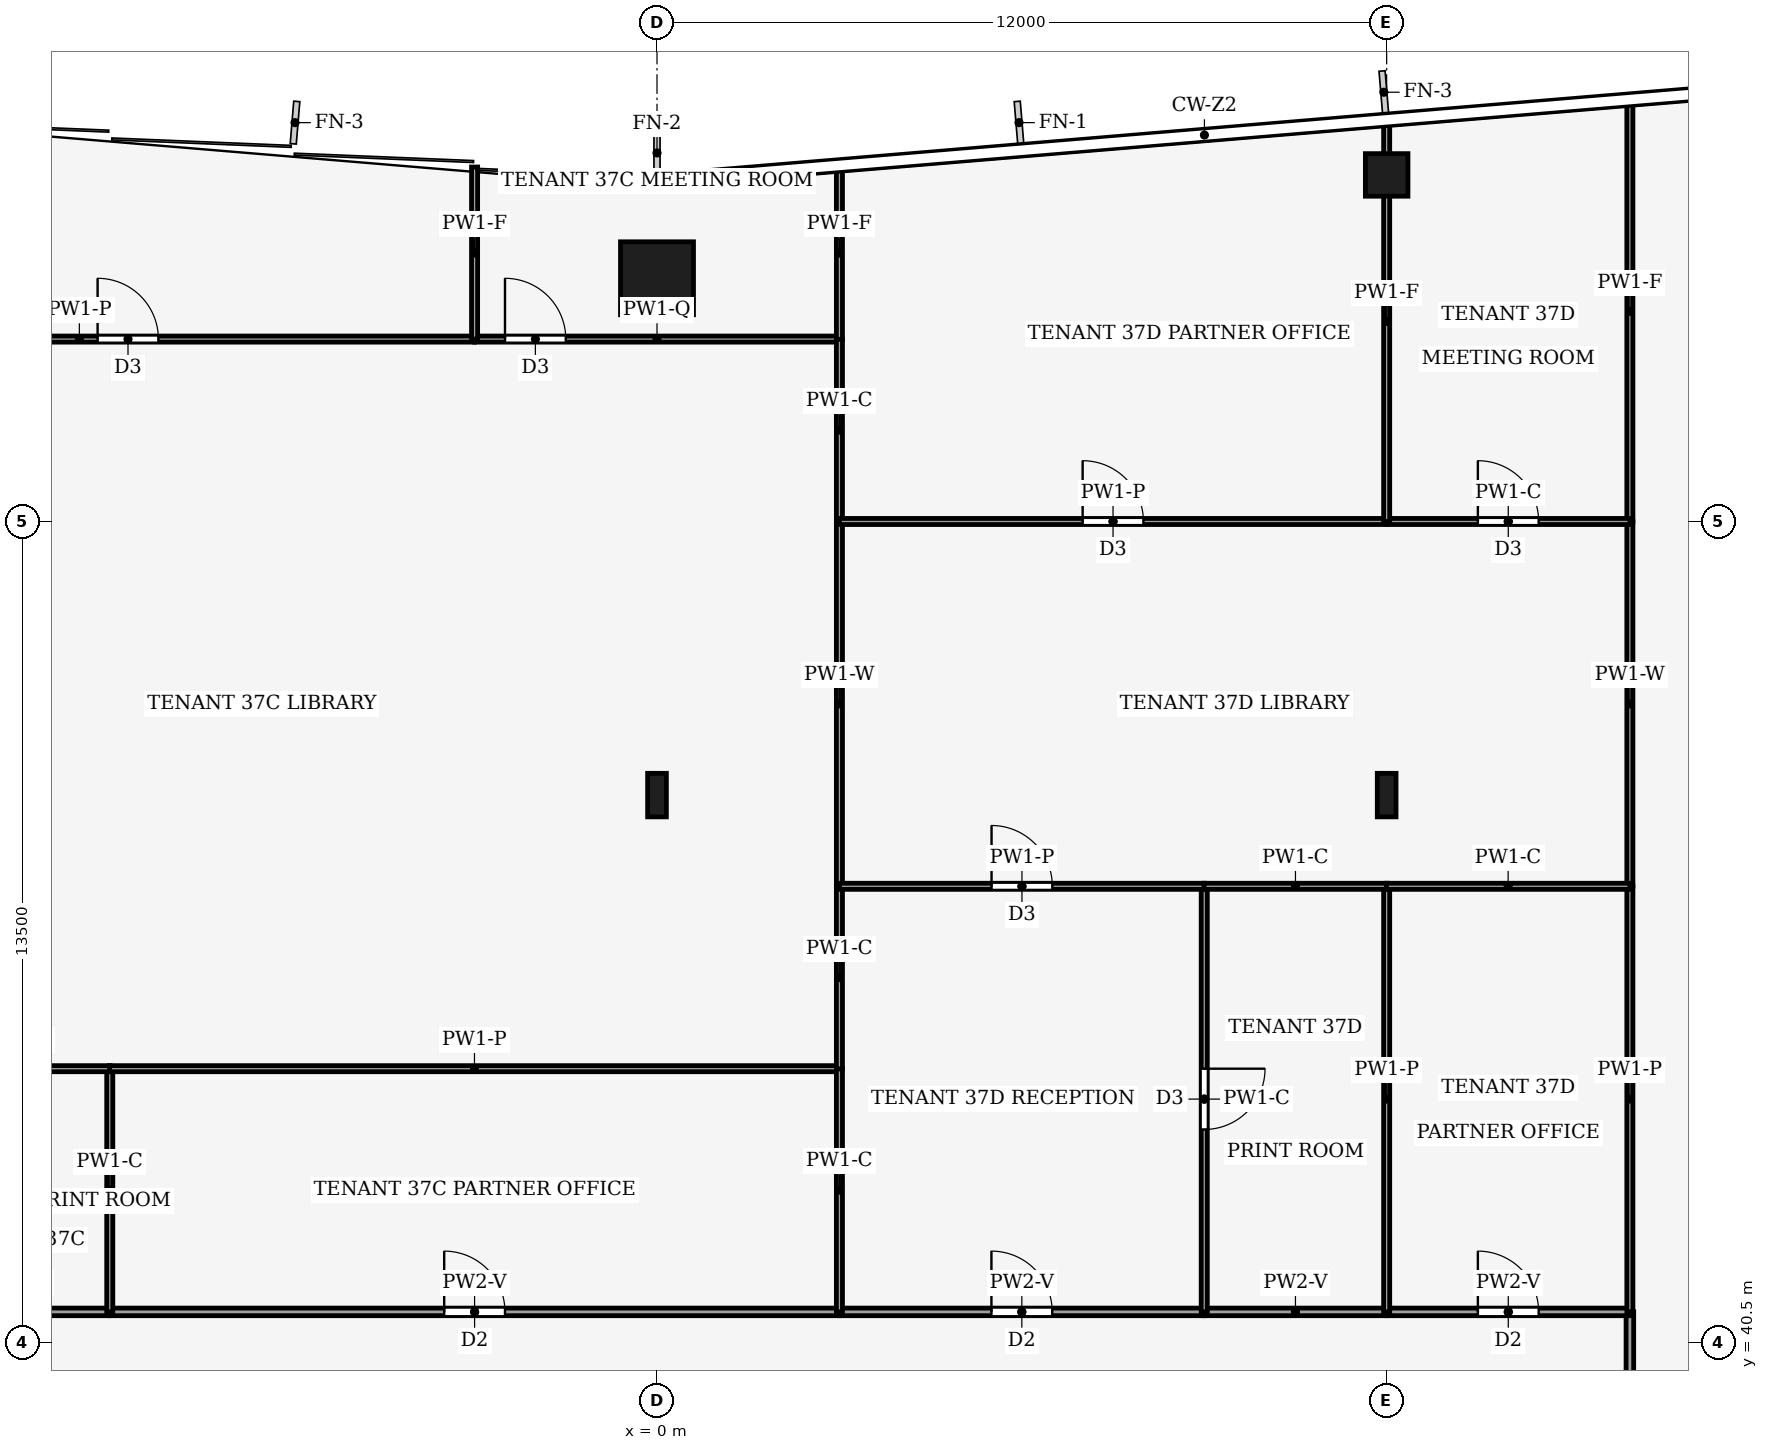
"""IFC4 building model, lengths in metres.
Left out: names, types, materials, properties, quantities, classifications, styles, units other than length and angle.
Written with IfcOpenShell. Run it as: python <this file> out.ifc"""

import sys

from ifc_helpers import new_model, si_unit, direction, frame, frame_2d, origin, origin_2d, place, context, subcontext, project, spatial, rectangle, hollow_rectangle, i_section, extrude, element, fill, save


model = new_model("IFC4")
c1 = context("Model", 3, precision=1e-05, world=origin(), true_north=direction((0.0, 1.0)))
c2 = subcontext(c1, "Body", "Model", "MODEL_VIEW")
j1 = project(units=[si_unit("LENGTHUNIT", "METRE"), si_unit("PLANEANGLEUNIT", "RADIAN")], contexts=[c1])
p1 = place(None, origin())
s1 = spatial("IfcSite", under=j1, at=p1, CompositionType="ELEMENT")
p2 = place(p1, origin())
s2 = spatial("IfcBuilding", under=s1, at=p2, CompositionType="ELEMENT")
p3 = place(p2, frame((0.0, 0.0, 162.0)))
s3 = spatial("IfcBuildingStorey", under=s2, at=p3, CompositionType="ELEMENT", Elevation=162.0)
p4 = place(p3, frame((0.0, 58.0, 0.0), z_axis=(0.0, 0.0, 1.0), x_axis=(1.0, 0.0, 0.0)))
e1 = element("IfcColumn", 1, at=p4, inside=s3, PredefinedType="COLUMN", context=c2, shape_type="SweptSolid", body=[
    extrude(hollow_rectangle(XDim=1.2, YDim=1.2, WallThickness=0.07, at=origin_2d()), origin(), (0.0, 0.0, 1.0), 4.0),
])
p5 = place(p3, frame((12.0, 59.7, 0.0), z_axis=(0.0, 0.0, 1.0), x_axis=(1.0, 0.0, 0.0)))
e2 = element("IfcColumn", 2, at=p5, inside=s3, PredefinedType="COLUMN", context=c2, shape_type="SweptSolid", body=[
    extrude(hollow_rectangle(XDim=0.7, YDim=0.7, WallThickness=0.03, at=origin_2d()), origin(), (0.0, 0.0, 1.0), 4.0),
])
for number, where, z_axis, x_axis in (
    (3, (0.0, 49.5, 0.0), (0.0, 0.0, 1.0), (1.0, 0.0, 0.0)),
    (4, (12.0, 49.5, 0.0), (0.0, 0.0, 1.0), (1.0, 0.0, 0.0)),
):
    element("IfcColumn", number, at=place(p3, frame(where, z_axis=z_axis, x_axis=x_axis)), inside=s3, PredefinedType="COLUMN", context=c2, shape_type="SweptSolid", body=[
        extrude(i_section(OverallWidth=0.308, OverallDepth=0.716, WebThickness=0.021, FlangeThickness=0.04, FilletRadius=0.027, at=origin_2d()), origin(), (0.0, 0.0, 1.0), 4.0),
    ])
p6 = place(p3, frame((16.0, 41.004, 0.0), z_axis=(0.0, 0.0, 1.0), x_axis=(0.0, -1.0, 0.0)))
e5 = element("IfcWall", 5, at=p6, inside=s3, PredefinedType="PARTITIONING", context=c2, shape_type="SweptSolid", body=[
    extrude(rectangle(XDim=11.004, YDim=0.125, at=frame_2d((5.502, 0.0))), origin(), (0.0, 0.0, 1.0), 3.14),
])
p7 = place(p6, frame((5.002, 0.0, 0.0)))
e6 = element("IfcOpeningElement", 6, at=p7, cuts=e5, PredefinedType="OPENING", context=c2, shape_type="SweptSolid", body=[
    extrude(rectangle(XDim=1.0, YDim=2.1, at=frame_2d((0.5, 1.05))), frame((0.0, 0.073, 0.0), z_axis=(0.0, -1.0, 0.0), x_axis=(1.0, 0.0, 0.0)), (0.0, 0.0, 1.0), 0.145),
])
p8 = place(p3, frame((-9.0, 41.0, 0.0), z_axis=(0.0, 0.0, 1.0), x_axis=(-1.0, 0.0, 0.0)))
e7 = element("IfcWall", 7, at=p8, inside=s3, PredefinedType="PARTITIONING", context=c2, shape_type="SweptSolid", body=[
    extrude(rectangle(XDim=3.0, YDim=0.125, at=frame_2d((1.5, 0.0))), origin(), (0.0, 0.0, 1.0), 3.44),
])
p9 = place(p3, frame((-9.0, 41.0, 0.0), z_axis=(0.0, 0.0, 1.0), x_axis=(1.0, 0.0, 0.0)))
e8 = element("IfcWall", 8, at=p9, inside=s3, PredefinedType="PARTITIONING", context=c2, shape_type="SweptSolid", body=[
    extrude(rectangle(XDim=12.0, YDim=0.125, at=frame_2d((6.0, 0.0))), origin(), (0.0, 0.0, 1.0), 3.44),
])
p10 = place(p9, frame((5.5, 0.0, 0.0)))
e9 = element("IfcOpeningElement", 9, at=p10, cuts=e8, PredefinedType="OPENING", context=c2, shape_type="SweptSolid", body=[
    extrude(rectangle(XDim=1.0, YDim=2.1, at=frame_2d((0.5, 1.05))), frame((0.0, 0.073, 0.0), z_axis=(0.0, -1.0, 0.0), x_axis=(1.0, 0.0, 0.0)), (0.0, 0.0, 1.0), 0.145),
])
p11 = place(p3, frame((3.0, 41.0, 0.0), z_axis=(0.0, 0.0, 1.0), x_axis=(1.0, 0.0, 0.0)))
e10 = element("IfcWall", 10, at=p11, inside=s3, PredefinedType="PARTITIONING", context=c2, shape_type="SweptSolid", body=[
    extrude(rectangle(XDim=6.0, YDim=0.125, at=frame_2d((3.0, 0.0))), origin(), (0.0, 0.0, 1.0), 3.44),
])
p12 = place(p11, frame((2.5, 0.0, 0.0)))
e11 = element("IfcOpeningElement", 11, at=p12, cuts=e10, PredefinedType="OPENING", context=c2, shape_type="SweptSolid", body=[
    extrude(rectangle(XDim=1.0, YDim=2.1, at=frame_2d((0.5, 1.05))), frame((0.0, 0.073, 0.0), z_axis=(0.0, -1.0, 0.0), x_axis=(1.0, 0.0, 0.0)), (0.0, 0.0, 1.0), 0.145),
])
p13 = place(p3, frame((12.0, 41.0, 0.0), z_axis=(0.0, 0.0, 1.0), x_axis=(-1.0, 0.0, 0.0)))
e12 = element("IfcWall", 12, at=p13, inside=s3, PredefinedType="PARTITIONING", context=c2, shape_type="SweptSolid", body=[
    extrude(rectangle(XDim=3.0, YDim=0.125, at=frame_2d((1.5, 0.0))), origin(), (0.0, 0.0, 1.0), 3.44),
])
p14 = place(p3, frame((12.0, 41.0, 0.0), z_axis=(0.0, 0.0, 1.0), x_axis=(1.0, 0.0, 0.0)))
e13 = element("IfcWall", 13, at=p14, inside=s3, PredefinedType="PARTITIONING", context=c2, shape_type="SweptSolid", body=[
    extrude(rectangle(XDim=4.0, YDim=0.125, at=frame_2d((2.0, 0.0))), origin(), (0.0, 0.0, 1.0), 3.44),
])
p15 = place(p14, frame((1.5, 0.0, 0.0)))
e14 = element("IfcOpeningElement", 14, at=p15, cuts=e13, PredefinedType="OPENING", context=c2, shape_type="SweptSolid", body=[
    extrude(rectangle(XDim=1.0, YDim=2.1, at=frame_2d((0.5, 1.05))), frame((0.0, 0.073, 0.0), z_axis=(0.0, -1.0, 0.0), x_axis=(1.0, 0.0, 0.0)), (0.0, 0.0, 1.0), 0.145),
])
p16 = place(p3, frame((16.0, 48.0, 0.0), z_axis=(0.0, 0.0, 1.0), x_axis=(0.0, -1.0, 0.0)))
e15 = element("IfcWall", 15, at=p16, inside=s3, PredefinedType="PARTITIONING", context=c2, shape_type="SweptSolid", body=[
    extrude(rectangle(XDim=7.0, YDim=0.1, at=frame_2d((3.5, 0.0))), origin(), (0.0, 0.0, 1.0), 3.44),
])
p17 = place(p3, frame((16.0, 54.0, 0.0), z_axis=(0.0, 0.0, 1.0), x_axis=(0.0, -1.0, 0.0)))
e16 = element("IfcWall", 16, at=p17, inside=s3, PredefinedType="PARTITIONING", context=c2, shape_type="SweptSolid", body=[
    extrude(rectangle(XDim=6.0, YDim=0.1, at=frame_2d((3.0, 0.0))), origin(), (0.0, 0.0, 1.0), 3.24),
])
p18 = place(p3, frame((16.0, 60.913, 0.0), z_axis=(0.0, 0.0, 1.0), x_axis=(0.0, -1.0, 0.0)))
e17 = element("IfcWall", 17, at=p18, inside=s3, PredefinedType="PARTITIONING", context=c2, shape_type="SweptSolid", body=[
    extrude(rectangle(XDim=6.913, YDim=0.1, at=frame_2d((3.457, 0.0))), origin(), (0.0, 0.0, 1.0), 3.04),
])
p19 = place(p3, frame((-9.0, 41.0, 0.0), z_axis=(0.0, 0.0, 1.0), x_axis=(0.0, 1.0, 0.0)))
e18 = element("IfcWall", 18, at=p19, inside=s3, PredefinedType="PARTITIONING", context=c2, shape_type="SweptSolid", body=[
    extrude(rectangle(XDim=4.0, YDim=0.1, at=frame_2d((2.0, 0.0))), origin(), (0.0, 0.0, 1.0), 3.87),
])
p20 = place(p3, frame((-8.996, 45.0, 0.0), z_axis=(0.0, 0.0, 1.0), x_axis=(-1.0, 0.0, 0.0)))
e19 = element("IfcWall", 19, at=p20, inside=s3, PredefinedType="PARTITIONING", context=c2, shape_type="SweptSolid", body=[
    extrude(rectangle(XDim=3.008, YDim=0.1, at=frame_2d((1.504, 0.0))), origin(), (0.0, 0.0, 1.0), 3.87),
])
p21 = place(p3, frame((3.0, 45.0, 0.0), z_axis=(0.0, 0.0, 1.0), x_axis=(-1.0, 0.0, 0.0)))
e20 = element("IfcWall", 20, at=p21, inside=s3, PredefinedType="PARTITIONING", context=c2, shape_type="SweptSolid", body=[
    extrude(rectangle(XDim=12.004, YDim=0.1, at=frame_2d((6.002, 0.0))), origin(), (0.0, 0.0, 1.0), 3.44),
])
p22 = place(p3, frame((3.0, 41.0, 0.0), z_axis=(0.0, 0.0, 1.0), x_axis=(0.0, 1.0, 0.0)))
e21 = element("IfcWall", 21, at=p22, inside=s3, PredefinedType="PARTITIONING", context=c2, shape_type="SweptSolid", body=[
    extrude(rectangle(XDim=4.004, YDim=0.1, at=frame_2d((2.002, 0.0))), origin(), (0.0, 0.0, 1.0), 3.87),
])
p23 = place(p3, frame((-16.0, 57.0, 0.0), z_axis=(0.0, 0.0, 1.0), x_axis=(1.0, 0.0, 0.0)))
e22 = element("IfcWall", 22, at=p23, inside=s3, PredefinedType="PARTITIONING", context=c2, shape_type="SweptSolid", body=[
    extrude(rectangle(XDim=13.0, YDim=0.1, at=frame_2d((6.5, 0.0))), origin(), (0.0, 0.0, 1.0), 3.44),
])
p24 = place(p23, frame((6.8, 0.0, 0.0)))
e23 = element("IfcOpeningElement", 23, at=p24, cuts=e22, PredefinedType="OPENING", context=c2, shape_type="SweptSolid", body=[
    extrude(rectangle(XDim=1.0, YDim=2.1, at=frame_2d((0.5, 1.05))), frame((0.0, 0.06, 0.0), z_axis=(0.0, -1.0, 0.0), x_axis=(1.0, 0.0, 0.0)), (0.0, 0.0, 1.0), 0.12),
])
p25 = place(p3, frame((-3.0, 57.0, 0.0), z_axis=(0.0, 0.0, 1.0), x_axis=(1.0, 0.0, 0.0)))
e24 = element("IfcWall", 24, at=p25, inside=s3, PredefinedType="PARTITIONING", context=c2, shape_type="SweptSolid", body=[
    extrude(rectangle(XDim=6.0, YDim=0.1, at=frame_2d((3.0, 0.0))), origin(), (0.0, 0.0, 1.0), 3.48),
])
p26 = place(p25, frame((0.5, 0.0, 0.0)))
e25 = element("IfcOpeningElement", 25, at=p26, cuts=e24, PredefinedType="OPENING", context=c2, shape_type="SweptSolid", body=[
    extrude(rectangle(XDim=1.0, YDim=2.1, at=frame_2d((0.5, 1.05))), frame((0.0, 0.06, 0.0), z_axis=(0.0, -1.0, 0.0), x_axis=(1.0, 0.0, 0.0)), (0.0, 0.0, 1.0), 0.12),
])
p27 = place(p3, frame((3.0, 44.996, 0.0), z_axis=(0.0, 0.0, 1.0), x_axis=(0.0, 1.0, 0.0)))
e26 = element("IfcWall", 26, at=p27, inside=s3, PredefinedType="PARTITIONING", context=c2, shape_type="SweptSolid", body=[
    extrude(rectangle(XDim=3.004, YDim=0.1, at=frame_2d((1.502, 0.0))), origin(), (0.0, 0.0, 1.0), 3.87),
])
p28 = place(p3, frame((3.0, 48.0, 0.0), z_axis=(0.0, 0.0, 1.0), x_axis=(0.0, 1.0, 0.0)))
e27 = element("IfcWall", 27, at=p28, inside=s3, PredefinedType="PARTITIONING", context=c2, shape_type="SweptSolid", body=[
    extrude(rectangle(XDim=6.0, YDim=0.1, at=frame_2d((3.0, 0.0))), origin(), (0.0, 0.0, 1.0), 3.24),
])
p29 = place(p3, frame((3.0, 54.0, 0.0), z_axis=(0.0, 0.0, 1.0), x_axis=(0.0, 1.0, 0.0)))
e28 = element("IfcWall", 28, at=p29, inside=s3, PredefinedType="PARTITIONING", context=c2, shape_type="SweptSolid", body=[
    extrude(rectangle(XDim=3.004, YDim=0.1, at=frame_2d((1.502, 0.0))), origin(), (0.0, 0.0, 1.0), 3.87),
])
p30 = place(p3, frame((-3.0, 57.0, 0.0), z_axis=(0.0, 0.0, 1.0), x_axis=(0.0, 1.0, 0.0)))
e29 = element("IfcWall", 29, at=p30, inside=s3, PredefinedType="PARTITIONING", context=c2, shape_type="SweptSolid", body=[
    extrude(rectangle(XDim=2.83, YDim=0.1, at=frame_2d((1.415, 0.0))), origin(), (0.0, 0.0, 1.0), 3.04),
])
p31 = place(p3, frame((3.0, 56.996, 0.0), z_axis=(0.0, 0.0, 1.0), x_axis=(0.0, 1.0, 0.0)))
e30 = element("IfcWall", 30, at=p31, inside=s3, PredefinedType="PARTITIONING", context=c2, shape_type="SweptSolid", body=[
    extrude(rectangle(XDim=2.834, YDim=0.1, at=frame_2d((1.417, 0.0))), origin(), (0.0, 0.0, 1.0), 3.04),
])
p32 = place(p3, frame((9.0, 48.0, 0.0), z_axis=(0.0, 0.0, 1.0), x_axis=(0.0, -1.0, 0.0)))
e31 = element("IfcWall", 31, at=p32, inside=s3, PredefinedType="PARTITIONING", context=c2, shape_type="SweptSolid", body=[
    extrude(rectangle(XDim=7.0, YDim=0.1, at=frame_2d((3.5, 0.0))), origin(), (0.0, 0.0, 1.0), 3.87),
])
p33 = place(p32, frame((3.0, 0.0, 0.0)))
e32 = element("IfcOpeningElement", 32, at=p33, cuts=e31, PredefinedType="OPENING", context=c2, shape_type="SweptSolid", body=[
    extrude(rectangle(XDim=1.0, YDim=2.1, at=frame_2d((0.5, 1.05))), frame((0.0, 0.06, 0.0), z_axis=(0.0, -1.0, 0.0), x_axis=(1.0, 0.0, 0.0)), (0.0, 0.0, 1.0), 0.12),
])
p34 = place(p3, frame((3.0, 48.0, 0.0), z_axis=(0.0, 0.0, 1.0), x_axis=(1.0, 0.0, 0.0)))
e33 = element("IfcWall", 33, at=p34, inside=s3, PredefinedType="PARTITIONING", context=c2, shape_type="SweptSolid", body=[
    extrude(rectangle(XDim=6.004, YDim=0.1, at=frame_2d((3.002, 0.0))), origin(), (0.0, 0.0, 1.0), 3.44),
])
p35 = place(p34, frame((2.502, 0.0, 0.0)))
e34 = element("IfcOpeningElement", 34, at=p35, cuts=e33, PredefinedType="OPENING", context=c2, shape_type="SweptSolid", body=[
    extrude(rectangle(XDim=1.0, YDim=2.1, at=frame_2d((0.5, 1.05))), frame((0.0, 0.06, 0.0), z_axis=(0.0, -1.0, 0.0), x_axis=(1.0, 0.0, 0.0)), (0.0, 0.0, 1.0), 0.12),
])
p36 = place(p3, frame((12.0, 41.0, 0.0), z_axis=(0.0, 0.0, 1.0), x_axis=(0.0, 1.0, 0.0)))
e35 = element("IfcWall", 35, at=p36, inside=s3, PredefinedType="PARTITIONING", context=c2, shape_type="SweptSolid", body=[
    extrude(rectangle(XDim=7.0, YDim=0.1, at=frame_2d((3.5, 0.0))), origin(), (0.0, 0.0, 1.0), 3.44),
])
p37 = place(p3, frame((12.004, 48.0, 0.0), z_axis=(0.0, 0.0, 1.0), x_axis=(-1.0, 0.0, 0.0)))
e36 = element("IfcWall", 36, at=p37, inside=s3, PredefinedType="PARTITIONING", context=c2, shape_type="SweptSolid", body=[
    extrude(rectangle(XDim=3.008, YDim=0.1, at=frame_2d((1.504, 0.0))), origin(), (0.0, 0.0, 1.0), 3.87),
])
p38 = place(p3, frame((16.0, 48.0, 0.0), z_axis=(0.0, 0.0, 1.0), x_axis=(-1.0, 0.0, 0.0)))
e37 = element("IfcWall", 37, at=p38, inside=s3, PredefinedType="PARTITIONING", context=c2, shape_type="SweptSolid", body=[
    extrude(rectangle(XDim=4.004, YDim=0.1, at=frame_2d((2.002, 0.0))), origin(), (0.0, 0.0, 1.0), 3.87),
])
p39 = place(p3, frame((3.0, 54.0, 0.0), z_axis=(0.0, 0.0, 1.0), x_axis=(1.0, 0.0, 0.0)))
e38 = element("IfcWall", 38, at=p39, inside=s3, PredefinedType="PARTITIONING", context=c2, shape_type="SweptSolid", body=[
    extrude(rectangle(XDim=9.0, YDim=0.1, at=frame_2d((4.5, 0.0))), origin(), (0.0, 0.0, 1.0), 3.44),
])
p40 = place(p39, frame((4.0, 0.0, 0.0)))
e39 = element("IfcOpeningElement", 39, at=p40, cuts=e38, PredefinedType="OPENING", context=c2, shape_type="SweptSolid", body=[
    extrude(rectangle(XDim=1.0, YDim=2.1, at=frame_2d((0.5, 1.05))), frame((0.0, 0.06, 0.0), z_axis=(0.0, -1.0, 0.0), x_axis=(1.0, 0.0, 0.0)), (0.0, 0.0, 1.0), 0.12),
])
p41 = place(p3, frame((12.0, 54.0, 0.0), z_axis=(0.0, 0.0, 1.0), x_axis=(1.0, 0.0, 0.0)))
e40 = element("IfcWall", 40, at=p41, inside=s3, PredefinedType="PARTITIONING", context=c2, shape_type="SweptSolid", body=[
    extrude(rectangle(XDim=4.0, YDim=0.1, at=frame_2d((2.0, 0.0))), origin(), (0.0, 0.0, 1.0), 3.87),
])
p42 = place(p41, frame((1.5, 0.0, 0.0)))
e41 = element("IfcOpeningElement", 41, at=p42, cuts=e40, PredefinedType="OPENING", context=c2, shape_type="SweptSolid", body=[
    extrude(rectangle(XDim=1.0, YDim=2.1, at=frame_2d((0.5, 1.05))), frame((0.0, 0.06, 0.0), z_axis=(0.0, -1.0, 0.0), x_axis=(1.0, 0.0, 0.0)), (0.0, 0.0, 1.0), 0.12),
])
p43 = place(p3, frame((12.0, 54.0, 0.0), z_axis=(0.0, 0.0, 1.0), x_axis=(0.0, 1.0, 0.0)))
e42 = element("IfcWall", 42, at=p43, inside=s3, PredefinedType="PARTITIONING", context=c2, shape_type="SweptSolid", body=[
    extrude(rectangle(XDim=6.58, YDim=0.1, at=frame_2d((3.29, 0.0))), origin(), (0.0, 0.0, 1.0), 3.04),
])
p44 = place(p10, origin())
e43 = element("IfcDoor", 43, at=p44, inside=s3, OperationType="SINGLE_SWING_RIGHT", PredefinedType="DOOR", context=c2, shape_type="SweptSolid", body=[
    extrude(rectangle(XDim=1.0, YDim=2.1, at=frame_2d((0.5, 1.05))), frame((0.0, 0.025, 0.0), z_axis=(0.0, -1.0, 0.0), x_axis=(1.0, 0.0, 0.0)), (0.0, 0.0, 1.0), 0.05),
])
fill(e9, e43)
p45 = place(p12, origin())
e44 = element("IfcDoor", 44, at=p45, inside=s3, OperationType="SINGLE_SWING_LEFT", PredefinedType="DOOR", context=c2, shape_type="SweptSolid", body=[
    extrude(rectangle(XDim=1.0, YDim=2.1, at=frame_2d((0.5, 1.05))), frame((0.0, 0.025, 0.0), z_axis=(0.0, -1.0, 0.0), x_axis=(1.0, 0.0, 0.0)), (0.0, 0.0, 1.0), 0.05),
])
fill(e11, e44)
p46 = place(p15, origin())
e45 = element("IfcDoor", 45, at=p46, inside=s3, OperationType="SINGLE_SWING_RIGHT", PredefinedType="DOOR", context=c2, shape_type="SweptSolid", body=[
    extrude(rectangle(XDim=1.0, YDim=2.1, at=frame_2d((0.5, 1.05))), frame((0.0, 0.025, 0.0), z_axis=(0.0, -1.0, 0.0), x_axis=(1.0, 0.0, 0.0)), (0.0, 0.0, 1.0), 0.05),
])
fill(e14, e45)
p47 = place(p24, origin())
e46 = element("IfcDoor", 46, at=p47, inside=s3, OperationType="SINGLE_SWING_RIGHT", PredefinedType="DOOR", context=c2, shape_type="SweptSolid", body=[
    extrude(rectangle(XDim=1.0, YDim=2.1, at=frame_2d((0.5, 1.05))), frame((0.0, 0.025, 0.0), z_axis=(0.0, -1.0, 0.0), x_axis=(1.0, 0.0, 0.0)), (0.0, 0.0, 1.0), 0.05),
])
fill(e23, e46)
p48 = place(p26, origin())
e47 = element("IfcDoor", 47, at=p48, inside=s3, OperationType="SINGLE_SWING_LEFT", PredefinedType="DOOR", context=c2, shape_type="SweptSolid", body=[
    extrude(rectangle(XDim=1.0, YDim=2.1, at=frame_2d((0.5, 1.05))), frame((0.0, 0.025, 0.0), z_axis=(0.0, -1.0, 0.0), x_axis=(1.0, 0.0, 0.0)), (0.0, 0.0, 1.0), 0.05),
])
fill(e25, e47)
p49 = place(p33, origin())
e48 = element("IfcDoor", 48, at=p49, inside=s3, OperationType="SINGLE_SWING_LEFT", PredefinedType="DOOR", context=c2, shape_type="SweptSolid", body=[
    extrude(rectangle(XDim=1.0, YDim=2.1, at=frame_2d((0.5, 1.05))), frame((0.0, 0.025, 0.0), z_axis=(0.0, -1.0, 0.0), x_axis=(1.0, 0.0, 0.0)), (0.0, 0.0, 1.0), 0.05),
])
fill(e32, e48)
p50 = place(p35, origin())
e49 = element("IfcDoor", 49, at=p50, inside=s3, OperationType="SINGLE_SWING_RIGHT", PredefinedType="DOOR", context=c2, shape_type="SweptSolid", body=[
    extrude(rectangle(XDim=1.0, YDim=2.1, at=frame_2d((0.5, 1.05))), frame((0.0, 0.025, 0.0), z_axis=(0.0, -1.0, 0.0), x_axis=(1.0, 0.0, 0.0)), (0.0, 0.0, 1.0), 0.05),
])
fill(e34, e49)
p51 = place(p40, origin())
e50 = element("IfcDoor", 50, at=p51, inside=s3, OperationType="SINGLE_SWING_LEFT", PredefinedType="DOOR", context=c2, shape_type="SweptSolid", body=[
    extrude(rectangle(XDim=1.0, YDim=2.1, at=frame_2d((0.5, 1.05))), frame((0.0, 0.025, 0.0), z_axis=(0.0, -1.0, 0.0), x_axis=(1.0, 0.0, 0.0)), (0.0, 0.0, 1.0), 0.05),
])
fill(e39, e50)
p52 = place(p42, origin())
e51 = element("IfcDoor", 51, at=p52, inside=s3, OperationType="SINGLE_SWING_RIGHT", PredefinedType="DOOR", context=c2, shape_type="SweptSolid", body=[
    extrude(rectangle(XDim=1.0, YDim=2.1, at=frame_2d((0.5, 1.05))), frame((0.0, 0.025, 0.0), z_axis=(0.0, -1.0, 0.0), x_axis=(1.0, 0.0, 0.0)), (0.0, 0.0, 1.0), 0.05),
])
fill(e41, e51)
save(model, sys.argv[1])
